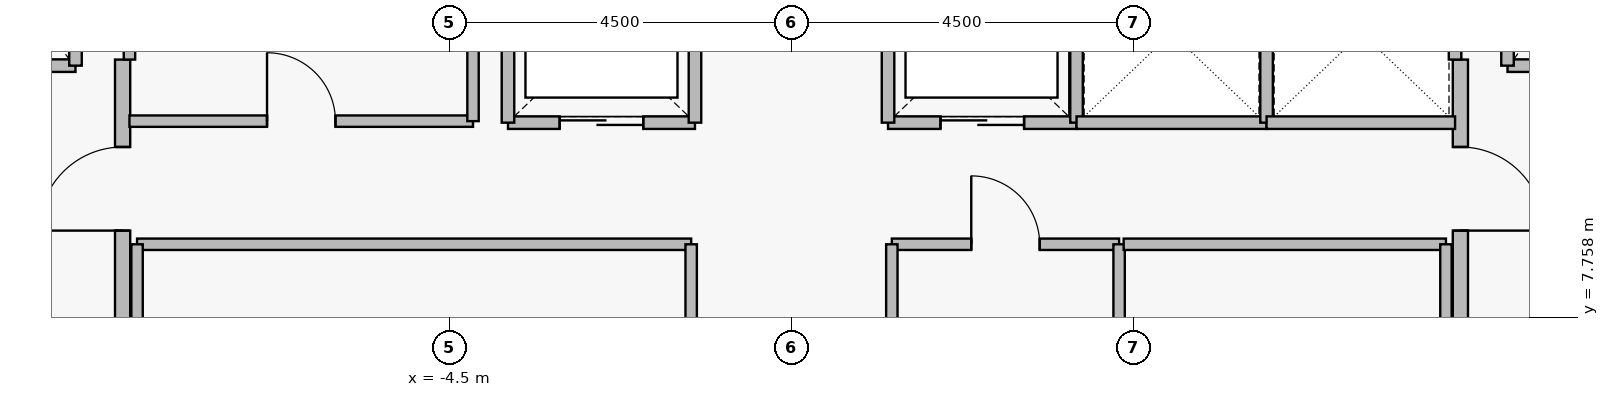
"""IFC4 building model, lengths in metres.
Left out: names, types, materials, properties, quantities, classifications, styles, units other than length and angle.
Written with IfcOpenShell. Run it as: python <this file> out.ifc"""

import sys

from ifc_helpers import new_model, si_unit, direction, frame, frame_2d, origin, place, context, subcontext, project, spatial, rectangle, extrude, element, fill, save


model = new_model("IFC4")
c1 = context("Model", 3, precision=1e-05, world=origin(), true_north=direction((0.0, 1.0)))
c2 = subcontext(c1, "Body", "Model", "MODEL_VIEW")
j1 = project(units=[si_unit("LENGTHUNIT", "METRE"), si_unit("PLANEANGLEUNIT", "RADIAN")], contexts=[c1])
p1 = place(None, origin())
s1 = spatial("IfcSite", under=j1, at=p1, CompositionType="ELEMENT")
p2 = place(p1, origin())
s2 = spatial("IfcBuilding", under=s1, at=p2, CompositionType="ELEMENT")
p3 = place(p2, frame((0.0, 0.0, 199.9)))
s3 = spatial("IfcBuildingStorey", under=s2, at=p3, CompositionType="ELEMENT", Elevation=199.9)
p4 = place(p3, frame((-8.8, 5.05, 0.0), z_axis=(0.0, 0.0, 1.0), x_axis=(0.0, 1.0, 0.0)))
e1 = element("IfcWall", 1, at=p4, inside=s3, PredefinedType="PARTITIONING", context=c2, shape_type="SweptSolid", body=[
    extrude(rectangle(XDim=6.1, YDim=0.2, at=frame_2d((3.05, 0.0))), origin(), (0.0, 0.0, 1.0), 3.53),
])
p5 = place(p4, frame((0.25, 0.0, 0.0)))
e2 = element("IfcOpeningElement", 2, at=p5, cuts=e1, PredefinedType="OPENING", context=c2, shape_type="SweptSolid", body=[
    extrude(rectangle(XDim=1.1, YDim=2.2, at=frame_2d((0.55, 1.1))), frame((0.0, 0.11, 0.0), z_axis=(0.0, -1.0, 0.0), x_axis=(1.0, 0.0, 0.0)), (0.0, 0.0, 1.0), 0.22),
])
p6 = place(p4, frame((3.85, 0.0, 0.0)))
e3 = element("IfcOpeningElement", 3, at=p6, cuts=e1, PredefinedType="OPENING", context=c2, shape_type="SweptSolid", body=[
    extrude(rectangle(XDim=1.1, YDim=2.2, at=frame_2d((0.55, 1.1))), frame((0.0, 0.11, 0.0), z_axis=(0.0, -1.0, 0.0), x_axis=(1.0, 0.0, 0.0)), (0.0, 0.0, 1.0), 0.22),
])
p7 = place(p3, frame((8.8, 11.15, 0.0), z_axis=(0.0, 0.0, 1.0), x_axis=(0.0, -1.0, 0.0)))
e4 = element("IfcWall", 4, at=p7, inside=s3, PredefinedType="PARTITIONING", context=c2, shape_type="SweptSolid", body=[
    extrude(rectangle(XDim=6.1, YDim=0.2, at=frame_2d((3.05, 0.0))), origin(), (0.0, 0.0, 1.0), 3.53),
])
p8 = place(p7, frame((1.15, 0.0, 0.0)))
e5 = element("IfcOpeningElement", 5, at=p8, cuts=e4, PredefinedType="OPENING", context=c2, shape_type="SweptSolid", body=[
    extrude(rectangle(XDim=1.1, YDim=2.2, at=frame_2d((0.55, 1.1))), frame((0.0, 0.11, 0.0), z_axis=(0.0, -1.0, 0.0), x_axis=(1.0, 0.0, 0.0)), (0.0, 0.0, 1.0), 0.22),
])
p9 = place(p7, frame((4.75, 0.0, 0.0)))
e6 = element("IfcOpeningElement", 6, at=p9, cuts=e4, PredefinedType="OPENING", context=c2, shape_type="SweptSolid", body=[
    extrude(rectangle(XDim=1.1, YDim=2.2, at=frame_2d((0.55, 1.1))), frame((0.0, 0.11, 0.0), z_axis=(0.0, -1.0, 0.0), x_axis=(1.0, 0.0, 0.0)), (0.0, 0.0, 1.0), 0.22),
])
p10 = place(p3, frame((-11.58, 11.07, 0.0), z_axis=(0.0, 0.0, 1.0), x_axis=(1.0, 0.0, 0.0)))
e7 = element("IfcWall", 7, at=p10, inside=s3, PredefinedType="PARTITIONING", context=c2, shape_type="SweptSolid", body=[
    extrude(rectangle(XDim=2.16, YDim=0.165, at=frame_2d((1.08, 0.0))), origin(), (0.0, 0.0, 1.0), 3.53),
])
p11 = place(p10, frame((0.53, 0.0, 0.0)))
e8 = element("IfcOpeningElement", 8, at=p11, cuts=e7, PredefinedType="OPENING", context=c2, shape_type="SweptSolid", body=[
    extrude(rectangle(XDim=1.15, YDim=2.25, at=frame_2d((0.575, 1.125))), frame((0.0, 0.093, 0.0), z_axis=(0.0, -1.0, 0.0), x_axis=(1.0, 0.0, 0.0)), (0.0, 0.0, 1.0), 0.185),
])
p12 = place(p3, frame((9.42, 11.07, 0.0), z_axis=(0.0, 0.0, 1.0), x_axis=(1.0, 0.0, 0.0)))
e9 = element("IfcWall", 9, at=p12, inside=s3, PredefinedType="PARTITIONING", context=c2, shape_type="SweptSolid", body=[
    extrude(rectangle(XDim=2.16, YDim=0.165, at=frame_2d((1.08, 0.0))), origin(), (0.0, 0.0, 1.0), 3.53),
])
p13 = place(p12, frame((0.53, 0.0, 0.0)))
e10 = element("IfcOpeningElement", 10, at=p13, cuts=e9, PredefinedType="OPENING", context=c2, shape_type="SweptSolid", body=[
    extrude(rectangle(XDim=1.15, YDim=2.25, at=frame_2d((0.575, 1.125))), frame((0.0, 0.093, 0.0), z_axis=(0.0, -1.0, 0.0), x_axis=(1.0, 0.0, 0.0)), (0.0, 0.0, 1.0), 0.185),
])
p14 = place(p3, frame((-3.73, 10.32, 0.0), z_axis=(0.0, 0.0, 1.0), x_axis=(1.0, 0.0, 0.0)))
e11 = element("IfcWall", 11, at=p14, inside=s3, PredefinedType="PARTITIONING", context=c2, shape_type="SweptSolid", body=[
    extrude(rectangle(XDim=2.46, YDim=0.165, at=frame_2d((1.23, 0.0))), origin(), (0.0, 0.0, 1.0), 3.53),
])
p15 = place(p14, frame((0.68, 0.0, 0.0)))
e12 = element("IfcOpeningElement", 12, at=p15, cuts=e11, PredefinedType="OPENING", context=c2, shape_type="SweptSolid", body=[
    extrude(rectangle(XDim=1.1, YDim=2.25, at=frame_2d((0.55, 1.125))), frame((0.0, 0.093, 0.0), z_axis=(0.0, -1.0, 0.0), x_axis=(1.0, 0.0, 0.0)), (0.0, 0.0, 1.0), 0.185),
])
p16 = place(p3, frame((1.27, 10.32, 0.0), z_axis=(0.0, 0.0, 1.0), x_axis=(1.0, 0.0, 0.0)))
e13 = element("IfcWall", 13, at=p16, inside=s3, PredefinedType="PARTITIONING", context=c2, shape_type="SweptSolid", body=[
    extrude(rectangle(XDim=2.48, YDim=0.165, at=frame_2d((1.24, 0.0))), origin(), (0.0, 0.0, 1.0), 3.53),
])
p17 = place(p16, frame((0.69, 0.0, 0.0)))
e14 = element("IfcOpeningElement", 14, at=p17, cuts=e13, PredefinedType="OPENING", context=c2, shape_type="SweptSolid", body=[
    extrude(rectangle(XDim=1.1, YDim=2.25, at=frame_2d((0.55, 1.125))), frame((0.0, 0.093, 0.0), z_axis=(0.0, -1.0, 0.0), x_axis=(1.0, 0.0, 0.0)), (0.0, 0.0, 1.0), 0.185),
])
p18 = place(p3, frame((-8.71, 10.34, 0.0), z_axis=(0.0, 0.0, 1.0), x_axis=(1.0, 0.0, 0.0)))
e15 = element("IfcWall", 15, at=p18, inside=s3, PredefinedType="PARTITIONING", context=c2, shape_type="SweptSolid", body=[
    extrude(rectangle(XDim=4.52, YDim=0.15, at=frame_2d((2.26, 0.0))), origin(), (0.0, 0.0, 1.0), 3.53),
])
p19 = place(p18, frame((1.81, 0.0, 0.0)))
e16 = element("IfcOpeningElement", 16, at=p19, cuts=e15, PredefinedType="OPENING", context=c2, shape_type="SweptSolid", body=[
    extrude(rectangle(XDim=0.9, YDim=2.15, at=frame_2d((0.45, 1.075))), frame((0.0, 0.085, 0.0), z_axis=(0.0, -1.0, 0.0), x_axis=(1.0, 0.0, 0.0)), (0.0, 0.0, 1.0), 0.17),
])
p20 = place(p3, frame((1.32, 8.72, 0.0), z_axis=(0.0, 0.0, 1.0), x_axis=(1.0, 0.0, 0.0)))
e17 = element("IfcWall", 17, at=p20, inside=s3, PredefinedType="PARTITIONING", context=c2, shape_type="SweptSolid", body=[
    extrude(rectangle(XDim=2.99, YDim=0.15, at=frame_2d((1.495, 0.0))), origin(), (0.0, 0.0, 1.0), 3.53),
])
p21 = place(p20, frame((1.045, 0.0, 0.0)))
e18 = element("IfcOpeningElement", 18, at=p21, cuts=e17, PredefinedType="OPENING", context=c2, shape_type="SweptSolid", body=[
    extrude(rectangle(XDim=0.9, YDim=2.15, at=frame_2d((0.45, 1.075))), frame((0.0, 0.085, 0.0), z_axis=(0.0, -1.0, 0.0), x_axis=(1.0, 0.0, 0.0)), (0.0, 0.0, 1.0), 0.17),
])
for number, where, z_axis, x_axis in (
    (19, (-9.42, 11.07, 0.0), (0.0, 0.0, 1.0), (0.0, 1.0, 0.0)),
    (20, (9.42, 11.07, 0.0), (0.0, 0.0, 1.0), (0.0, 1.0, 0.0)),
):
    element("IfcWall", number, at=place(p3, frame(where, z_axis=z_axis, x_axis=x_axis)), inside=s3, PredefinedType="PARTITIONING", context=c2, shape_type="SweptSolid", body=[
        extrude(rectangle(XDim=2.96, YDim=0.165, at=frame_2d((1.48, 0.0))), origin(), (0.0, 0.0, 1.0), 3.53),
    ])
for number, where, z_axis, x_axis in (
    (21, (-3.73, 10.32, 0.0), (0.0, 0.0, 1.0), (0.0, 1.0, 0.0)),
    (22, (-1.27, 10.32, 0.0), (0.0, 0.0, 1.0), (0.0, 1.0, 0.0)),
    (23, (1.27, 10.32, 0.0), (0.0, 0.0, 1.0), (0.0, 1.0, 0.0)),
    (24, (3.75, 10.32, 0.0), (0.0, 0.0, 1.0), (0.0, 1.0, 0.0)),
):
    element("IfcWall", number, at=place(p3, frame(where, z_axis=z_axis, x_axis=x_axis)), inside=s3, PredefinedType="PARTITIONING", context=c2, shape_type="SweptSolid", body=[
        extrude(rectangle(XDim=2.36, YDim=0.165, at=frame_2d((1.18, 0.0))), origin(), (0.0, 0.0, 1.0), 3.53),
    ])
p22 = place(p3, frame((3.75, 10.32, 0.0), z_axis=(0.0, 0.0, 1.0), x_axis=(1.0, 0.0, 0.0)))
e25 = element("IfcWall", 25, at=p22, inside=s3, PredefinedType="PARTITIONING", context=c2, shape_type="SweptSolid", body=[
    extrude(rectangle(XDim=2.5, YDim=0.165, at=frame_2d((1.25, 0.0))), origin(), (0.0, 0.0, 1.0), 3.53),
])
p23 = place(p3, frame((6.25, 10.32, 0.0), z_axis=(0.0, 0.0, 1.0), x_axis=(0.0, 1.0, 0.0)))
e26 = element("IfcWall", 26, at=p23, inside=s3, PredefinedType="PARTITIONING", context=c2, shape_type="SweptSolid", body=[
    extrude(rectangle(XDim=2.36, YDim=0.165, at=frame_2d((1.18, 0.0))), origin(), (0.0, 0.0, 1.0), 3.53),
])
p24 = place(p3, frame((6.25, 10.32, 0.0), z_axis=(0.0, 0.0, 1.0), x_axis=(1.0, 0.0, 0.0)))
e27 = element("IfcWall", 27, at=p24, inside=s3, PredefinedType="PARTITIONING", context=c2, shape_type="SweptSolid", body=[
    extrude(rectangle(XDim=2.48, YDim=0.165, at=frame_2d((1.24, 0.0))), origin(), (0.0, 0.0, 1.0), 3.53),
])
p25 = place(p3, frame((8.73, 11.15, 0.0), z_axis=(0.0, 0.0, 1.0), x_axis=(0.0, 1.0, 0.0)))
e28 = element("IfcWall", 28, at=p25, inside=s3, PredefinedType="PARTITIONING", context=c2, shape_type="SweptSolid", body=[
    extrude(rectangle(XDim=1.53, YDim=0.165, at=frame_2d((0.765, 0.0))), origin(), (0.0, 0.0, 1.0), 3.53),
])
p26 = place(p3, frame((-8.71, 11.15, 0.0), z_axis=(0.0, 0.0, 1.0), x_axis=(0.0, 1.0, 0.0)))
e29 = element("IfcWall", 29, at=p26, inside=s3, PredefinedType="PARTITIONING", context=c2, shape_type="SweptSolid", body=[
    extrude(rectangle(XDim=1.71, YDim=0.15, at=frame_2d((0.855, 0.0))), origin(), (0.0, 0.0, 1.0), 3.53),
])
p27 = place(p3, frame((-4.19, 10.34, 0.0), z_axis=(0.0, 0.0, 1.0), x_axis=(0.0, 1.0, 0.0)))
e30 = element("IfcWall", 30, at=p27, inside=s3, PredefinedType="PARTITIONING", context=c2, shape_type="SweptSolid", body=[
    extrude(rectangle(XDim=2.52, YDim=0.15, at=frame_2d((1.26, 0.0))), origin(), (0.0, 0.0, 1.0), 3.53),
])
p28 = place(p3, frame((-8.61, 8.72, 0.0), z_axis=(0.0, 0.0, 1.0), x_axis=(1.0, 0.0, 0.0)))
e31 = element("IfcWall", 31, at=p28, inside=s3, PredefinedType="PARTITIONING", context=c2, shape_type="SweptSolid", body=[
    extrude(rectangle(XDim=7.29, YDim=0.15, at=frame_2d((3.645, 0.0))), origin(), (0.0, 0.0, 1.0), 3.53),
])
for number, where, z_axis, x_axis in (
    (32, (-8.61, 6.48, 0.0), (0.0, 0.0, 1.0), (0.0, 1.0, 0.0)),
    (33, (-1.32, 6.48, 0.0), (0.0, 0.0, 1.0), (0.0, 1.0, 0.0)),
    (34, (1.32, 6.48, 0.0), (0.0, 0.0, 1.0), (0.0, 1.0, 0.0)),
    (35, (4.31, 6.48, 0.0), (0.0, 0.0, 1.0), (0.0, 1.0, 0.0)),
):
    element("IfcWall", number, at=place(p3, frame(where, z_axis=z_axis, x_axis=x_axis)), inside=s3, PredefinedType="PARTITIONING", context=c2, shape_type="SweptSolid", body=[
        extrude(rectangle(XDim=2.24, YDim=0.15, at=frame_2d((1.12, 0.0))), origin(), (0.0, 0.0, 1.0), 3.53),
    ])
p29 = place(p3, frame((4.37, 8.72, 0.0), z_axis=(0.0, 0.0, 1.0), x_axis=(1.0, 0.0, 0.0)))
e36 = element("IfcWall", 36, at=p29, inside=s3, PredefinedType="PARTITIONING", context=c2, shape_type="SweptSolid", body=[
    extrude(rectangle(XDim=4.24, YDim=0.15, at=frame_2d((2.12, 0.0))), origin(), (0.0, 0.0, 1.0), 3.53),
])
p30 = place(p3, frame((8.61, 6.48, 0.0), z_axis=(0.0, 0.0, 1.0), x_axis=(0.0, 1.0, 0.0)))
e37 = element("IfcWall", 37, at=p30, inside=s3, PredefinedType="PARTITIONING", context=c2, shape_type="SweptSolid", body=[
    extrude(rectangle(XDim=2.24, YDim=0.15, at=frame_2d((1.12, 0.0))), origin(), (0.0, 0.0, 1.0), 3.53),
])
p31 = place(p6, origin())
e38 = element("IfcDoor", 38, at=p31, inside=s3, OperationType="SINGLE_SWING_LEFT", PredefinedType="DOOR", context=c2, shape_type="SweptSolid", body=[
    extrude(rectangle(XDim=1.1, YDim=2.2, at=frame_2d((0.55, 1.1))), frame((0.0, 0.025, 0.0), z_axis=(0.0, -1.0, 0.0), x_axis=(1.0, 0.0, 0.0)), (0.0, 0.0, 1.0), 0.05),
])
fill(e3, e38)
p32 = place(p8, origin())
e39 = element("IfcDoor", 39, at=p32, inside=s3, OperationType="SINGLE_SWING_RIGHT", PredefinedType="DOOR", context=c2, shape_type="SweptSolid", body=[
    extrude(rectangle(XDim=1.1, YDim=2.2, at=frame_2d((0.55, 1.1))), frame((0.0, 0.025, 0.0), z_axis=(0.0, -1.0, 0.0), x_axis=(1.0, 0.0, 0.0)), (0.0, 0.0, 1.0), 0.05),
])
fill(e5, e39)
p33 = place(p15, origin())
e40 = element("IfcDoor", 40, at=p33, inside=s3, OperationType="SLIDING_TO_LEFT", PredefinedType="DOOR", context=c2, shape_type="SweptSolid", body=[
    extrude(rectangle(XDim=1.1, YDim=2.25, at=frame_2d((0.55, 1.125))), frame((0.0, 0.025, 0.0), z_axis=(0.0, -1.0, 0.0), x_axis=(1.0, 0.0, 0.0)), (0.0, 0.0, 1.0), 0.05),
])
fill(e12, e40)
p34 = place(p17, origin())
e41 = element("IfcDoor", 41, at=p34, inside=s3, OperationType="SLIDING_TO_LEFT", PredefinedType="DOOR", context=c2, shape_type="SweptSolid", body=[
    extrude(rectangle(XDim=1.1, YDim=2.25, at=frame_2d((0.55, 1.125))), frame((0.0, 0.025, 0.0), z_axis=(0.0, -1.0, 0.0), x_axis=(1.0, 0.0, 0.0)), (0.0, 0.0, 1.0), 0.05),
])
fill(e14, e41)
p35 = place(p19, origin())
e42 = element("IfcDoor", 42, at=p35, inside=s3, OperationType="SINGLE_SWING_LEFT", PredefinedType="DOOR", context=c2, shape_type="SweptSolid", body=[
    extrude(rectangle(XDim=0.9, YDim=2.15, at=frame_2d((0.45, 1.075))), frame((0.0, 0.025, 0.0), z_axis=(0.0, -1.0, 0.0), x_axis=(1.0, 0.0, 0.0)), (0.0, 0.0, 1.0), 0.05),
])
fill(e16, e42)
p36 = place(p21, origin())
e43 = element("IfcDoor", 43, at=p36, inside=s3, OperationType="SINGLE_SWING_LEFT", PredefinedType="DOOR", context=c2, shape_type="SweptSolid", body=[
    extrude(rectangle(XDim=0.9, YDim=2.15, at=frame_2d((0.45, 1.075))), frame((0.0, 0.025, 0.0), z_axis=(0.0, -1.0, 0.0), x_axis=(1.0, 0.0, 0.0)), (0.0, 0.0, 1.0), 0.05),
])
fill(e18, e43)
save(model, sys.argv[1])
